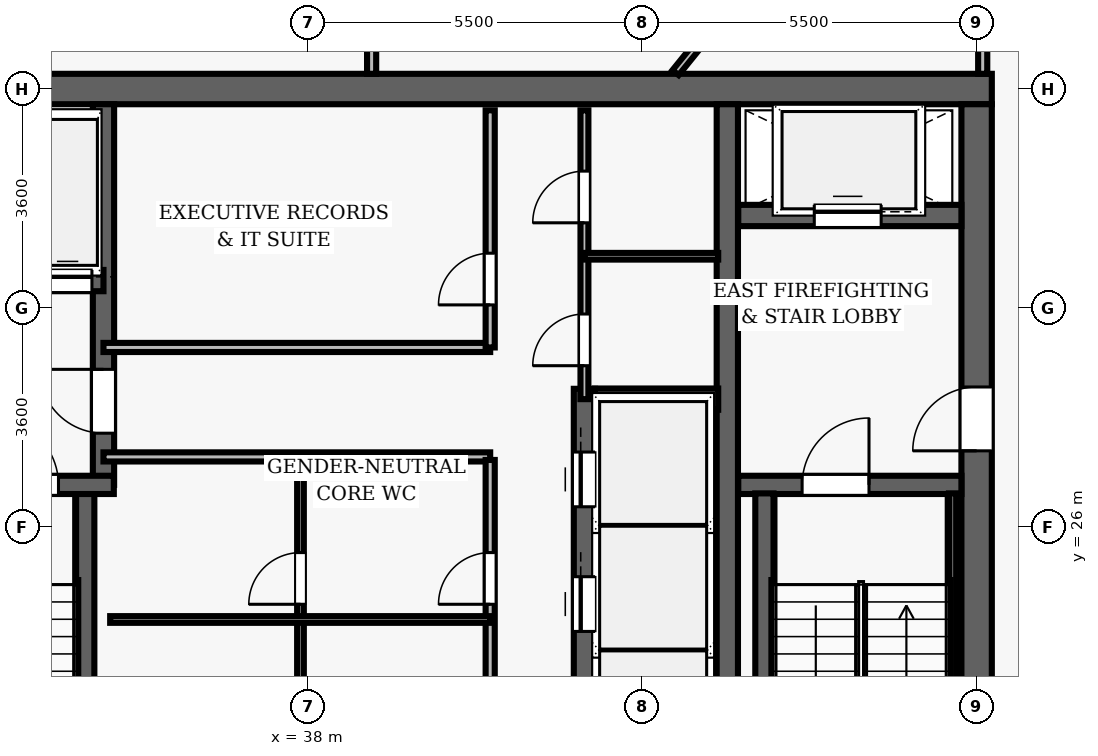
"""IFC4 building model, lengths in metres.
Left out: names, types, materials, properties, quantities, classifications, styles, units other than length and angle.
Written with IfcOpenShell. Run it as: python <this file> out.ifc"""

import sys

from ifc_helpers import new_model, si_unit, direction, frame, frame_2d, origin, place, context, subcontext, project, spatial, rectangle, extrude, element, fill, save


model = new_model("IFC4")
c1 = context("Model", 3, precision=1e-05, world=origin(), true_north=direction((0.0, 1.0)))
c2 = subcontext(c1, "Body", "Model", "MODEL_VIEW")
j1 = project(units=[si_unit("LENGTHUNIT", "METRE"), si_unit("PLANEANGLEUNIT", "RADIAN")], contexts=[c1])
p1 = place(None, origin())
s1 = spatial("IfcSite", under=j1, at=p1, CompositionType="ELEMENT")
p2 = place(p1, origin())
s2 = spatial("IfcBuilding", under=s1, at=p2, CompositionType="ELEMENT")
p3 = place(p2, frame((0.0, 0.0, 245.9)))
s3 = spatial("IfcBuildingStorey", under=s2, at=p3, CompositionType="ELEMENT", Elevation=245.9)
p4 = place(p3, frame((26.75, 33.2, 0.0), z_axis=(0.0, 0.0, 1.0), x_axis=(1.0, 0.0, 0.0)))
e1 = element("IfcWall", 1, at=p4, inside=s3, PredefinedType="SHEAR", context=c2, shape_type="SweptSolid", body=[
    extrude(rectangle(XDim=22.5, YDim=0.5, at=frame_2d((11.25, 0.0))), origin(), (0.0, 0.0, 1.0), 3.85),
])
p5 = place(p3, frame((49.0, 19.05, 0.0), z_axis=(0.0, 0.0, 1.0), x_axis=(0.0, 1.0, 0.0)))
e2 = element("IfcWall", 2, at=p5, inside=s3, PredefinedType="SHEAR", context=c2, shape_type="SweptSolid", body=[
    extrude(rectangle(XDim=13.9, YDim=0.5, at=frame_2d((6.95, 0.0))), origin(), (0.0, 0.0, 1.0), 3.85),
])
p6 = place(p5, frame((8.2, 0.0, 0.0)))
e3 = element("IfcOpeningElement", 3, at=p6, cuts=e2, PredefinedType="OPENING", context=c2, shape_type="SweptSolid", body=[
    extrude(rectangle(XDim=1.05, YDim=2.15, at=frame_2d((0.525, 1.075))), frame((0.0, 0.26, 0.0), z_axis=(0.0, -1.0, 0.0), x_axis=(1.0, 0.0, 0.0)), (0.0, 0.0, 1.0), 0.52),
])
p7 = place(p3, frame((44.9, 19.05, 0.0), z_axis=(0.0, 0.0, 1.0), x_axis=(0.0, 1.0, 0.0)))
e4 = element("IfcWall", 4, at=p7, inside=s3, PredefinedType="SHEAR", context=c2, shape_type="SweptSolid", body=[
    extrude(rectangle(XDim=13.9, YDim=0.35, at=frame_2d((6.95, 0.0))), origin(), (0.0, 0.0, 1.0), 3.85),
])
p8 = place(p3, frame((45.08, 26.69, 0.0), z_axis=(0.0, 0.0, 1.0), x_axis=(1.0, 0.0, 0.0)))
e5 = element("IfcWall", 5, at=p8, inside=s3, PredefinedType="SHEAR", context=c2, shape_type="SweptSolid", body=[
    extrude(rectangle(XDim=3.67, YDim=0.3, at=frame_2d((1.835, 0.0))), origin(), (0.0, 0.0, 1.0), 3.85),
])
p9 = place(p8, frame((1.05, 0.0, 0.0)))
e6 = element("IfcOpeningElement", 6, at=p9, cuts=e5, PredefinedType="OPENING", context=c2, shape_type="SweptSolid", body=[
    extrude(rectangle(XDim=1.1, YDim=2.15, at=frame_2d((0.55, 1.075))), frame((0.0, 0.16, 0.0), z_axis=(0.0, -1.0, 0.0), x_axis=(1.0, 0.0, 0.0)), (0.0, 0.0, 1.0), 0.32),
])
p10 = place(p3, frame((45.51, 19.05, 0.0), z_axis=(0.0, 0.0, 1.0), x_axis=(0.0, 1.0, 0.0)))
e7 = element("IfcWall", 7, at=p10, inside=s3, PredefinedType="SHEAR", context=c2, shape_type="SweptSolid", body=[
    extrude(rectangle(XDim=7.5, YDim=0.3, at=frame_2d((3.75, 0.0))), origin(), (0.0, 0.0, 1.0), 3.85),
])
p11 = place(p3, frame((48.605, 19.1, 0.0), z_axis=(0.0, 0.0, 1.0), x_axis=(0.0, 1.0, 0.0)))
e8 = element("IfcWall", 8, at=p11, inside=s3, PredefinedType="SHEAR", context=c2, shape_type="SweptSolid", body=[
    extrude(rectangle(XDim=7.45, YDim=0.12, at=frame_2d((3.725, 0.0))), origin(), (0.0, 0.0, 1.0), 3.85),
])
p12 = place(p3, frame((45.08, 31.12, 0.0), z_axis=(0.0, 0.0, 1.0), x_axis=(1.0, 0.0, 0.0)))
e9 = element("IfcWall", 9, at=p12, inside=s3, PredefinedType="SHEAR", context=c2, shape_type="SweptSolid", body=[
    extrude(rectangle(XDim=3.67, YDim=0.35, at=frame_2d((1.835, 0.0))), origin(), (0.0, 0.0, 1.0), 3.04),
])
p13 = place(p12, frame((1.25, 0.0, 0.0)))
e10 = element("IfcOpeningElement", 10, at=p13, cuts=e9, PredefinedType="OPENING", context=c2, shape_type="SweptSolid", body=[
    extrude(rectangle(XDim=1.1, YDim=2.15, at=frame_2d((0.55, 1.075))), frame((0.0, 0.185, 0.0), z_axis=(0.0, -1.0, 0.0), x_axis=(1.0, 0.0, 0.0)), (0.0, 0.0, 1.0), 0.37),
])
p14 = place(p3, frame((34.34, 19.05, 0.0), z_axis=(0.0, 0.0, 1.0), x_axis=(0.0, 1.0, 0.0)))
e11 = element("IfcWall", 11, at=p14, inside=s3, PredefinedType="SHEAR", context=c2, shape_type="SweptSolid", body=[
    extrude(rectangle(XDim=7.5, YDim=0.3, at=frame_2d((3.75, 0.0))), origin(), (0.0, 0.0, 1.0), 3.85),
])
p15 = place(p3, frame((34.64, 26.69, 0.0), z_axis=(0.0, 0.0, 1.0), x_axis=(0.0, 1.0, 0.0)))
e12 = element("IfcWall", 12, at=p15, inside=s3, PredefinedType="SHEAR", context=c2, shape_type="SweptSolid", body=[
    extrude(rectangle(XDim=6.26, YDim=0.35, at=frame_2d((3.13, 0.0))), origin(), (0.0, 0.0, 1.0), 3.85),
])
p16 = place(p15, frame((0.85, 0.0, 0.0)))
e13 = element("IfcOpeningElement", 13, at=p16, cuts=e12, PredefinedType="OPENING", context=c2, shape_type="SweptSolid", body=[
    extrude(rectangle(XDim=1.05, YDim=2.15, at=frame_2d((0.525, 1.075))), frame((0.0, 0.185, 0.0), z_axis=(0.0, -1.0, 0.0), x_axis=(1.0, 0.0, 0.0)), (0.0, 0.0, 1.0), 0.37),
])
p17 = place(p3, frame((31.25, 26.69, 0.0), z_axis=(0.0, 0.0, 1.0), x_axis=(1.0, 0.0, 0.0)))
e14 = element("IfcWall", 14, at=p17, inside=s3, PredefinedType="SHEAR", context=c2, shape_type="SweptSolid", body=[
    extrude(rectangle(XDim=3.56, YDim=0.3, at=frame_2d((1.78, 0.0))), origin(), (0.0, 0.0, 1.0), 3.85),
])
p18 = place(p17, frame((1.55, 0.0, 0.0)))
e15 = element("IfcOpeningElement", 15, at=p18, cuts=e14, PredefinedType="OPENING", context=c2, shape_type="SweptSolid", body=[
    extrude(rectangle(XDim=1.1, YDim=2.15, at=frame_2d((0.55, 1.075))), frame((0.0, 0.16, 0.0), z_axis=(0.0, -1.0, 0.0), x_axis=(1.0, 0.0, 0.0)), (0.0, 0.0, 1.0), 0.32),
])
p19 = place(p3, frame((32.23, 30.05, 0.0), z_axis=(0.0, 0.0, 1.0), x_axis=(1.0, 0.0, 0.0)))
e16 = element("IfcWall", 16, at=p19, inside=s3, PredefinedType="SHEAR", context=c2, shape_type="SweptSolid", body=[
    extrude(rectangle(XDim=2.41, YDim=0.35, at=frame_2d((1.205, 0.0))), origin(), (0.0, 0.0, 1.0), 3.04),
])
p20 = place(p19, frame((0.42, 0.0, 0.0)))
e17 = element("IfcOpeningElement", 17, at=p20, cuts=e16, PredefinedType="OPENING", context=c2, shape_type="SweptSolid", body=[
    extrude(rectangle(XDim=0.8, YDim=2.15, at=frame_2d((0.4, 1.075))), frame((0.0, 0.185, 0.0), z_axis=(0.0, -1.0, 0.0), x_axis=(1.0, 0.0, 0.0)), (0.0, 0.0, 1.0), 0.37),
])
p21 = place(p19, frame((1.42, 0.0, 0.0)))
e18 = element("IfcOpeningElement", 18, at=p21, cuts=e16, PredefinedType="OPENING", context=c2, shape_type="SweptSolid", body=[
    extrude(rectangle(XDim=0.8, YDim=2.15, at=frame_2d((0.4, 1.075))), frame((0.0, 0.185, 0.0), z_axis=(0.0, -1.0, 0.0), x_axis=(1.0, 0.0, 0.0)), (0.0, 0.0, 1.0), 0.37),
])
p22 = place(p3, frame((42.55, 21.73, 0.0), z_axis=(0.0, 0.0, 1.0), x_axis=(0.0, 1.0, 0.0)))
e19 = element("IfcWall", 19, at=p22, inside=s3, PredefinedType="SHEAR", context=c2, shape_type="SweptSolid", body=[
    extrude(rectangle(XDim=6.54, YDim=0.35, at=frame_2d((3.27, 0.0))), origin(), (0.0, 0.0, 1.0), 3.04),
])
p23 = place(p22, frame((0.5, 0.0, 0.0)))
e20 = element("IfcOpeningElement", 20, at=p23, cuts=e19, PredefinedType="OPENING", context=c2, shape_type="SweptSolid", body=[
    extrude(rectangle(XDim=0.9, YDim=2.15, at=frame_2d((0.45, 1.075))), frame((0.0, 0.185, 0.0), z_axis=(0.0, -1.0, 0.0), x_axis=(1.0, 0.0, 0.0)), (0.0, 0.0, 1.0), 0.37),
])
p24 = place(p22, frame((2.55, 0.0, 0.0)))
e21 = element("IfcOpeningElement", 21, at=p24, cuts=e19, PredefinedType="OPENING", context=c2, shape_type="SweptSolid", body=[
    extrude(rectangle(XDim=0.9, YDim=2.15, at=frame_2d((0.45, 1.075))), frame((0.0, 0.185, 0.0), z_axis=(0.0, -1.0, 0.0), x_axis=(1.0, 0.0, 0.0)), (0.0, 0.0, 1.0), 0.37),
])
p25 = place(p22, frame((4.6, 0.0, 0.0)))
e22 = element("IfcOpeningElement", 22, at=p25, cuts=e19, PredefinedType="OPENING", context=c2, shape_type="SweptSolid", body=[
    extrude(rectangle(XDim=0.9, YDim=2.15, at=frame_2d((0.45, 1.075))), frame((0.0, 0.185, 0.0), z_axis=(0.0, -1.0, 0.0), x_axis=(1.0, 0.0, 0.0)), (0.0, 0.0, 1.0), 0.37),
])
p26 = place(p3, frame((42.72, 28.1, 0.0), z_axis=(0.0, 0.0, 1.0), x_axis=(1.0, 0.0, 0.0)))
e23 = element("IfcWall", 23, at=p26, inside=s3, PredefinedType="SHEAR", context=c2, shape_type="SweptSolid", body=[
    extrude(rectangle(XDim=2.03, YDim=0.35, at=frame_2d((1.015, 0.0))), origin(), (0.0, 0.0, 1.0), 3.04),
])
for number, where, z_axis, x_axis in (
    (24, (34.64, 27.15, 0.0), (0.0, 0.0, 1.0), (1.0, 0.0, 0.0)),
    (25, (34.64, 28.95, 0.0), (0.0, 0.0, 1.0), (1.0, 0.0, 0.0)),
):
    element("IfcWall", number, at=place(p3, frame(where, z_axis=z_axis, x_axis=x_axis)), inside=s3, PredefinedType="PARTITIONING", context=c2, shape_type="SweptSolid", body=[
        extrude(rectangle(XDim=6.36, YDim=0.15, at=frame_2d((3.18, 0.0))), origin(), (0.0, 0.0, 1.0), 3.04),
    ])
p27 = place(p3, frame((41.0, 28.95, 0.0), z_axis=(0.0, 0.0, 1.0), x_axis=(0.0, 1.0, 0.0)))
e26 = element("IfcWall", 26, at=p27, inside=s3, PredefinedType="PARTITIONING", context=c2, shape_type="SweptSolid", body=[
    extrude(rectangle(XDim=3.9, YDim=0.15, at=frame_2d((1.95, 0.0))), origin(), (0.0, 0.0, 1.0), 3.04),
])
p28 = place(p27, frame((0.7, 0.0, 0.0)))
e27 = element("IfcOpeningElement", 27, at=p28, cuts=e26, PredefinedType="OPENING", context=c2, shape_type="SweptSolid", body=[
    extrude(rectangle(XDim=0.85, YDim=2.1, at=frame_2d((0.425, 1.05))), frame((0.0, 0.085, 0.0), z_axis=(0.0, -1.0, 0.0), x_axis=(1.0, 0.0, 0.0)), (0.0, 0.0, 1.0), 0.17),
])
p29 = place(p3, frame((41.0, 19.15, 0.0), z_axis=(0.0, 0.0, 1.0), x_axis=(0.0, 1.0, 0.0)))
e28 = element("IfcWall", 28, at=p29, inside=s3, PredefinedType="PARTITIONING", context=c2, shape_type="SweptSolid", body=[
    extrude(rectangle(XDim=7.95, YDim=0.15, at=frame_2d((3.975, 0.0))), origin(), (0.0, 0.0, 1.0), 3.04),
])
p30 = place(p29, frame((0.25, 0.0, 0.0)))
e29 = element("IfcOpeningElement", 29, at=p30, cuts=e28, PredefinedType="OPENING", context=c2, shape_type="SweptSolid", body=[
    extrude(rectangle(XDim=0.85, YDim=2.1, at=frame_2d((0.425, 1.05))), frame((0.0, 0.085, 0.0), z_axis=(0.0, -1.0, 0.0), x_axis=(1.0, 0.0, 0.0)), (0.0, 0.0, 1.0), 0.17),
])
p31 = place(p29, frame((2.953, 0.0, 0.0)))
e30 = element("IfcOpeningElement", 30, at=p31, cuts=e28, PredefinedType="OPENING", context=c2, shape_type="SweptSolid", body=[
    extrude(rectangle(XDim=0.85, YDim=2.1, at=frame_2d((0.425, 1.05))), frame((0.0, 0.085, 0.0), z_axis=(0.0, -1.0, 0.0), x_axis=(1.0, 0.0, 0.0)), (0.0, 0.0, 1.0), 0.17),
])
p32 = place(p29, frame((5.576, 0.0, 0.0)))
e31 = element("IfcOpeningElement", 31, at=p32, cuts=e28, PredefinedType="OPENING", context=c2, shape_type="SweptSolid", body=[
    extrude(rectangle(XDim=0.85, YDim=2.1, at=frame_2d((0.425, 1.05))), frame((0.0, 0.085, 0.0), z_axis=(0.0, -1.0, 0.0), x_axis=(1.0, 0.0, 0.0)), (0.0, 0.0, 1.0), 0.17),
])
p33 = place(p3, frame((37.88, 19.15, 0.0), z_axis=(0.0, 0.0, 1.0), x_axis=(0.0, 1.0, 0.0)))
e32 = element("IfcWall", 32, at=p33, inside=s3, PredefinedType="PARTITIONING", context=c2, shape_type="SweptSolid", body=[
    extrude(rectangle(XDim=7.95, YDim=0.11, at=frame_2d((3.975, 0.0))), origin(), (0.0, 0.0, 1.0), 3.04),
])
p34 = place(p33, frame((0.25, 0.0, 0.0)))
e33 = element("IfcOpeningElement", 33, at=p34, cuts=e32, PredefinedType="OPENING", context=c2, shape_type="SweptSolid", body=[
    extrude(rectangle(XDim=0.85, YDim=2.1, at=frame_2d((0.425, 1.05))), frame((0.0, 0.065, 0.0), z_axis=(0.0, -1.0, 0.0), x_axis=(1.0, 0.0, 0.0)), (0.0, 0.0, 1.0), 0.13),
])
p35 = place(p33, frame((2.953, 0.0, 0.0)))
e34 = element("IfcOpeningElement", 34, at=p35, cuts=e32, PredefinedType="OPENING", context=c2, shape_type="SweptSolid", body=[
    extrude(rectangle(XDim=0.85, YDim=2.1, at=frame_2d((0.425, 1.05))), frame((0.0, 0.065, 0.0), z_axis=(0.0, -1.0, 0.0), x_axis=(1.0, 0.0, 0.0)), (0.0, 0.0, 1.0), 0.13),
])
p36 = place(p33, frame((5.576, 0.0, 0.0)))
e35 = element("IfcOpeningElement", 35, at=p36, cuts=e32, PredefinedType="OPENING", context=c2, shape_type="SweptSolid", body=[
    extrude(rectangle(XDim=0.85, YDim=2.1, at=frame_2d((0.425, 1.05))), frame((0.0, 0.065, 0.0), z_axis=(0.0, -1.0, 0.0), x_axis=(1.0, 0.0, 0.0)), (0.0, 0.0, 1.0), 0.13),
])
p37 = place(p3, frame((34.75, 24.477, 0.0), z_axis=(0.0, 0.0, 1.0), x_axis=(1.0, 0.0, 0.0)))
e36 = element("IfcWall", 36, at=p37, inside=s3, PredefinedType="PARTITIONING", context=c2, shape_type="SweptSolid", body=[
    extrude(rectangle(XDim=6.25, YDim=0.11, at=frame_2d((3.125, 0.0))), origin(), (0.0, 0.0, 1.0), 3.04),
])
p38 = place(p3, frame((42.55, 28.1, 0.0), z_axis=(0.0, 0.0, 1.0), x_axis=(0.0, 1.0, 0.0)))
e37 = element("IfcWall", 37, at=p38, inside=s3, PredefinedType="PARTITIONING", context=c2, shape_type="SweptSolid", body=[
    extrude(rectangle(XDim=4.75, YDim=0.13, at=frame_2d((2.375, 0.0))), origin(), (0.0, 0.0, 1.0), 3.04),
])
p39 = place(p38, frame((0.55, 0.0, 0.0)))
e38 = element("IfcOpeningElement", 38, at=p39, cuts=e37, PredefinedType="OPENING", context=c2, shape_type="SweptSolid", body=[
    extrude(rectangle(XDim=0.85, YDim=2.1, at=frame_2d((0.425, 1.05))), frame((0.0, 0.075, 0.0), z_axis=(0.0, -1.0, 0.0), x_axis=(1.0, 0.0, 0.0)), (0.0, 0.0, 1.0), 0.15),
])
p40 = place(p38, frame((2.9, 0.0, 0.0)))
e39 = element("IfcOpeningElement", 39, at=p40, cuts=e37, PredefinedType="OPENING", context=c2, shape_type="SweptSolid", body=[
    extrude(rectangle(XDim=0.85, YDim=2.1, at=frame_2d((0.425, 1.05))), frame((0.0, 0.075, 0.0), z_axis=(0.0, -1.0, 0.0), x_axis=(1.0, 0.0, 0.0)), (0.0, 0.0, 1.0), 0.15),
])
p41 = place(p3, frame((42.55, 30.45, 0.0), z_axis=(0.0, 0.0, 1.0), x_axis=(1.0, 0.0, 0.0)))
e40 = element("IfcWall", 40, at=p41, inside=s3, PredefinedType="PARTITIONING", context=c2, shape_type="SweptSolid", body=[
    extrude(rectangle(XDim=2.2, YDim=0.11, at=frame_2d((1.1, 0.0))), origin(), (0.0, 0.0, 1.0), 3.04),
])
p42 = place(p3, frame((49.1, 33.45, 0.0), z_axis=(0.0, 0.0, 1.0), x_axis=(0.0, 1.0, 0.0)))
e41 = element("IfcWall", 41, at=p42, inside=s3, PredefinedType="PARTITIONING", context=c2, shape_type="SweptSolid", body=[
    extrude(rectangle(XDim=7.95, YDim=0.15, at=frame_2d((3.975, 0.0))), origin(), (0.0, 0.0, 1.0), 3.04),
])
p43 = place(p42, frame((2.728, 0.0, 0.0)))
e42 = element("IfcOpeningElement", 42, at=p43, cuts=e41, PredefinedType="OPENING", context=c2, shape_type="SweptSolid", body=[
    extrude(rectangle(XDim=0.95, YDim=2.15, at=frame_2d((0.475, 1.075))), frame((0.0, 0.085, 0.0), z_axis=(0.0, -1.0, 0.0), x_axis=(1.0, 0.0, 0.0)), (0.0, 0.0, 1.0), 0.17),
])
p44 = place(p3, frame((39.05, 33.45, 0.0), z_axis=(0.0, 0.0, 1.0), x_axis=(0.0, 1.0, 0.0)))
e43 = element("IfcWall", 43, at=p44, inside=s3, PredefinedType="PARTITIONING", context=c2, shape_type="SweptSolid", body=[
    extrude(rectangle(XDim=6.95, YDim=0.15, at=frame_2d((3.475, 0.0))), origin(), (0.0, 0.0, 1.0), 3.04),
])
p45 = place(p44, frame((1.262, 0.0, 0.0)))
e44 = element("IfcOpeningElement", 44, at=p45, cuts=e43, PredefinedType="OPENING", context=c2, shape_type="SweptSolid", body=[
    extrude(rectangle(XDim=0.95, YDim=2.15, at=frame_2d((0.475, 1.075))), frame((0.0, 0.085, 0.0), z_axis=(0.0, -1.0, 0.0), x_axis=(1.0, 0.0, 0.0)), (0.0, 0.0, 1.0), 0.17),
])
p46 = place(p3, frame((44.049, 33.47, 0.0), z_axis=(0.0, 0.0, 1.0), x_axis=(0.629319722443, 0.777146502883, 0.0)))
e45 = element("IfcWall", 45, at=p46, inside=s3, PredefinedType="PARTITIONING", context=c2, shape_type="SweptSolid", body=[
    extrude(rectangle(XDim=7.803, YDim=0.13, at=frame_2d((3.902, 0.0))), origin(), (0.0, 0.0, 1.0), 3.04),
])
p47 = place(p9, origin())
e46 = element("IfcDoor", 46, at=p47, inside=s3, OperationType="SINGLE_SWING_RIGHT", PredefinedType="DOOR", context=c2, shape_type="SweptSolid", body=[
    extrude(rectangle(XDim=1.1, YDim=2.15, at=frame_2d((0.55, 1.075))), frame((0.0, 0.025, 0.0), z_axis=(0.0, -1.0, 0.0), x_axis=(1.0, 0.0, 0.0)), (0.0, 0.0, 1.0), 0.05),
])
fill(e6, e46)
p48 = place(p6, origin())
e47 = element("IfcDoor", 47, at=p48, inside=s3, OperationType="SINGLE_SWING_LEFT", PredefinedType="DOOR", context=c2, shape_type="SweptSolid", body=[
    extrude(rectangle(XDim=1.05, YDim=2.15, at=frame_2d((0.525, 1.075))), frame((0.0, 0.025, 0.0), z_axis=(0.0, -1.0, 0.0), x_axis=(1.0, 0.0, 0.0)), (0.0, 0.0, 1.0), 0.05),
])
fill(e3, e47)
p49 = place(p18, origin())
e48 = element("IfcDoor", 48, at=p49, inside=s3, OperationType="SINGLE_SWING_LEFT", PredefinedType="DOOR", context=c2, shape_type="SweptSolid", body=[
    extrude(rectangle(XDim=1.1, YDim=2.15, at=frame_2d((0.55, 1.075))), frame((0.0, 0.025, 0.0), z_axis=(0.0, -1.0, 0.0), x_axis=(1.0, 0.0, 0.0)), (0.0, 0.0, 1.0), 0.05),
])
fill(e15, e48)
p50 = place(p16, origin())
e49 = element("IfcDoor", 49, at=p50, inside=s3, OperationType="SINGLE_SWING_RIGHT", PredefinedType="DOOR", context=c2, shape_type="SweptSolid", body=[
    extrude(rectangle(XDim=1.05, YDim=2.15, at=frame_2d((0.525, 1.075))), frame((0.0, 0.025, 0.0), z_axis=(0.0, -1.0, 0.0), x_axis=(1.0, 0.0, 0.0)), (0.0, 0.0, 1.0), 0.05),
])
fill(e13, e49)
p51 = place(p28, origin())
e50 = element("IfcDoor", 50, at=p51, inside=s3, OperationType="SINGLE_SWING_LEFT", PredefinedType="DOOR", context=c2, shape_type="SweptSolid", body=[
    extrude(rectangle(XDim=0.85, YDim=2.1, at=frame_2d((0.425, 1.05))), frame((0.0, 0.025, 0.0), z_axis=(0.0, -1.0, 0.0), x_axis=(1.0, 0.0, 0.0)), (0.0, 0.0, 1.0), 0.05),
])
fill(e27, e50)
p52 = place(p32, origin())
e51 = element("IfcDoor", 51, at=p52, inside=s3, OperationType="SINGLE_SWING_LEFT", PredefinedType="DOOR", context=c2, shape_type="SweptSolid", body=[
    extrude(rectangle(XDim=0.85, YDim=2.1, at=frame_2d((0.425, 1.05))), frame((0.0, 0.025, 0.0), z_axis=(0.0, -1.0, 0.0), x_axis=(1.0, 0.0, 0.0)), (0.0, 0.0, 1.0), 0.05),
])
fill(e31, e51)
p53 = place(p36, origin())
e52 = element("IfcDoor", 52, at=p53, inside=s3, OperationType="SINGLE_SWING_LEFT", PredefinedType="DOOR", context=c2, shape_type="SweptSolid", body=[
    extrude(rectangle(XDim=0.85, YDim=2.1, at=frame_2d((0.425, 1.05))), frame((0.0, 0.025, 0.0), z_axis=(0.0, -1.0, 0.0), x_axis=(1.0, 0.0, 0.0)), (0.0, 0.0, 1.0), 0.05),
])
fill(e35, e52)
p54 = place(p39, origin())
e53 = element("IfcDoor", 53, at=p54, inside=s3, OperationType="SINGLE_SWING_LEFT", PredefinedType="DOOR", context=c2, shape_type="SweptSolid", body=[
    extrude(rectangle(XDim=0.85, YDim=2.1, at=frame_2d((0.425, 1.05))), frame((0.0, 0.025, 0.0), z_axis=(0.0, -1.0, 0.0), x_axis=(1.0, 0.0, 0.0)), (0.0, 0.0, 1.0), 0.05),
])
fill(e38, e53)
p55 = place(p40, origin())
e54 = element("IfcDoor", 54, at=p55, inside=s3, OperationType="SINGLE_SWING_LEFT", PredefinedType="DOOR", context=c2, shape_type="SweptSolid", body=[
    extrude(rectangle(XDim=0.85, YDim=2.1, at=frame_2d((0.425, 1.05))), frame((0.0, 0.025, 0.0), z_axis=(0.0, -1.0, 0.0), x_axis=(1.0, 0.0, 0.0)), (0.0, 0.0, 1.0), 0.05),
])
fill(e39, e54)
p56 = place(p24, origin())
e55 = element("IfcDoor", 55, at=p56, inside=s3, OperationType="SLIDING_TO_LEFT", PredefinedType="DOOR", context=c2, shape_type="SweptSolid", body=[
    extrude(rectangle(XDim=0.9, YDim=2.15, at=frame_2d((0.45, 1.075))), frame((0.0, 0.025, 0.0), z_axis=(0.0, -1.0, 0.0), x_axis=(1.0, 0.0, 0.0)), (0.0, 0.0, 1.0), 0.05),
])
fill(e21, e55)
p57 = place(p25, origin())
e56 = element("IfcDoor", 56, at=p57, inside=s3, OperationType="SLIDING_TO_LEFT", PredefinedType="DOOR", context=c2, shape_type="SweptSolid", body=[
    extrude(rectangle(XDim=0.9, YDim=2.15, at=frame_2d((0.45, 1.075))), frame((0.0, 0.025, 0.0), z_axis=(0.0, -1.0, 0.0), x_axis=(1.0, 0.0, 0.0)), (0.0, 0.0, 1.0), 0.05),
])
fill(e22, e56)
p58 = place(p13, origin())
e57 = element("IfcDoor", 57, at=p58, inside=s3, OperationType="SLIDING_TO_LEFT", PredefinedType="DOOR", context=c2, shape_type="SweptSolid", body=[
    extrude(rectangle(XDim=1.1, YDim=2.15, at=frame_2d((0.55, 1.075))), frame((0.0, 0.025, 0.0), z_axis=(0.0, -1.0, 0.0), x_axis=(1.0, 0.0, 0.0)), (0.0, 0.0, 1.0), 0.05),
])
fill(e10, e57)
p59 = place(p21, origin())
e58 = element("IfcDoor", 58, at=p59, inside=s3, OperationType="SLIDING_TO_LEFT", PredefinedType="DOOR", context=c2, shape_type="SweptSolid", body=[
    extrude(rectangle(XDim=0.8, YDim=2.15, at=frame_2d((0.4, 1.075))), frame((0.0, 0.025, 0.0), z_axis=(0.0, -1.0, 0.0), x_axis=(1.0, 0.0, 0.0)), (0.0, 0.0, 1.0), 0.05),
])
fill(e18, e58)
save(model, sys.argv[1])
